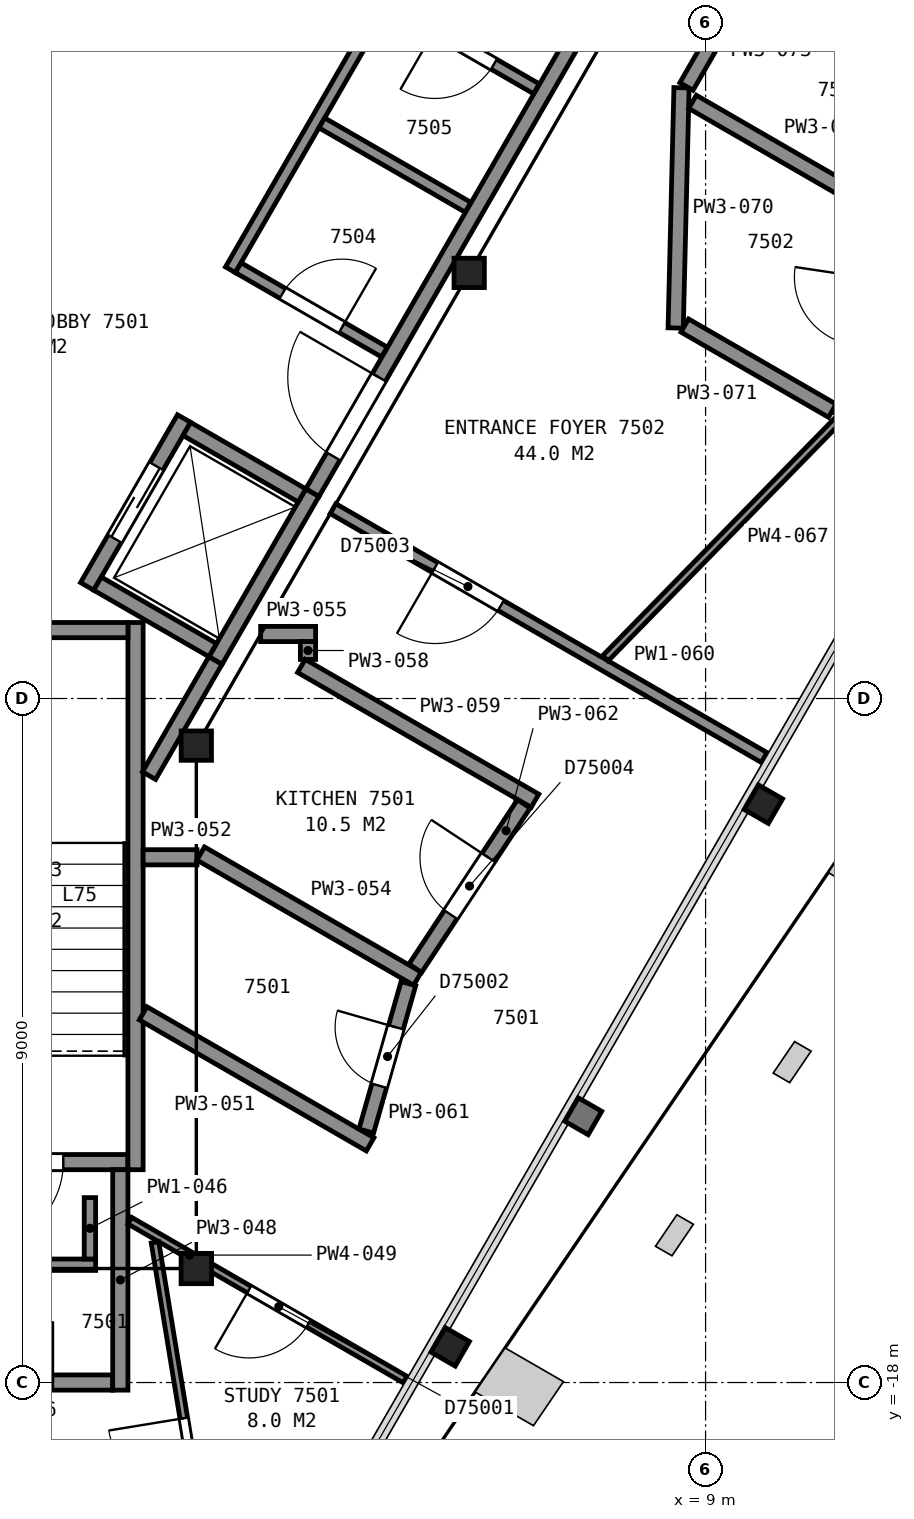
"""IFC4 building model, lengths in metres.
Left out: names, types, materials, properties, quantities, classifications, styles, units other than length and angle.
Written with IfcOpenShell. Run it as: python <this file> out.ifc"""

import sys

from ifc_helpers import new_model, si_unit, direction, frame, frame_2d, origin, origin_2d, place, context, subcontext, project, spatial, rectangle, i_section, extrude, element, fill, save


model = new_model("IFC4")
c1 = context("Model", 3, precision=1e-05, world=origin(), true_north=direction((0.0, 1.0)))
c2 = subcontext(c1, "Body", "Model", "MODEL_VIEW")
j1 = project(units=[si_unit("LENGTHUNIT", "METRE"), si_unit("PLANEANGLEUNIT", "RADIAN")], contexts=[c1])
p1 = place(None, origin())
s1 = spatial("IfcSite", under=j1, at=p1, CompositionType="ELEMENT")
p2 = place(p1, origin())
s2 = spatial("IfcBuilding", under=s1, at=p2, CompositionType="ELEMENT")
p3 = place(p2, frame((0.0, 0.0, 297.3)))
s3 = spatial("IfcBuildingStorey", under=s2, at=p3, CompositionType="ELEMENT", Elevation=297.3)
for number, where, z_axis, x_axis in (
    (1, (5.64, -17.53, 0.0), (0.0, 0.0, 1.0), (-0.5, -0.866, 0.0)),
    (2, (9.76, -10.39, 0.0), (0.0, 0.0, 1.0), (-0.5, -0.866, 0.0)),
):
    element("IfcColumn", number, at=place(p3, frame(where, z_axis=z_axis, x_axis=x_axis)), inside=s3, PredefinedType="COLUMN", context=c2, shape_type="SweptSolid", body=[
        extrude(i_section(OverallWidth=0.373, OverallDepth=0.368, WebThickness=0.015, FlangeThickness=0.024, FilletRadius=0.015, at=origin_2d()), origin(), (0.0, 0.0, 1.0), 3.7),
    ])
p4 = place(p3, frame((2.3, -16.5, 0.0), z_axis=(0.0, 0.0, 1.0), x_axis=(-1.0, 0.0, 0.0)))
e3 = element("IfcColumn", 3, at=p4, inside=s3, PredefinedType="COLUMN", context=c2, shape_type="SweptSolid", body=[
    extrude(i_section(OverallWidth=0.401, OverallDepth=0.399, WebThickness=0.025, FlangeThickness=0.04, FilletRadius=0.015, at=origin_2d()), origin(), (0.0, 0.0, 1.0), 3.7),
])
for number, where, z_axis, x_axis in (
    (4, (2.3, -9.62, 0.0), (0.0, 0.0, 1.0), (1.0, 0.0, 0.0)),
    (5, (5.89, -3.4, 0.0), (0.0, 0.0, 1.0), (1.0, 0.0, 0.0)),
):
    element("IfcColumn", number, at=place(p3, frame(where, z_axis=z_axis, x_axis=x_axis)), inside=s3, PredefinedType="COLUMN", context=c2, shape_type="SweptSolid", body=[
        extrude(i_section(OverallWidth=0.399, OverallDepth=0.386, WebThickness=0.021, FlangeThickness=0.033, FilletRadius=0.015, at=origin_2d()), origin(), (0.0, 0.0, 1.0), 3.7),
    ])
p5 = place(p3, frame((-1.4, -15.1, 0.0), z_axis=(0.0, 0.0, 1.0), x_axis=(1.0, 0.0, 0.0)))
e6 = element("IfcWall", 6, at=p5, inside=s3, PredefinedType="PARTITIONING", context=c2, shape_type="SweptSolid", body=[
    extrude(rectangle(XDim=2.8, YDim=0.2, at=frame_2d((1.4, 0.0))), origin(), (0.0, 0.0, 1.0), 3.45),
])
p6 = place(p5, frame((0.85, 0.0, 0.0)))
e7 = element("IfcOpeningElement", 7, at=p6, cuts=e6, PredefinedType="OPENING", context=c2, shape_type="SweptSolid", body=[
    extrude(rectangle(XDim=1.1, YDim=2.1, at=frame_2d((0.55, 1.05))), frame((0.0, 0.11, 0.0), z_axis=(0.0, -1.0, 0.0), x_axis=(1.0, 0.0, 0.0)), (0.0, 0.0, 1.0), 0.22),
])
p7 = place(p3, frame((1.5, -8.0, 0.0), z_axis=(0.0, 0.0, 1.0), x_axis=(0.0, -1.0, 0.0)))
e8 = element("IfcWall", 8, at=p7, inside=s3, PredefinedType="PARTITIONING", context=c2, shape_type="SweptSolid", body=[
    extrude(rectangle(XDim=7.2, YDim=0.2, at=frame_2d((3.6, 0.0))), origin(), (0.0, 0.0, 1.0), 3.45),
])
p8 = place(p3, frame((-1.4, -8.1, 0.0), z_axis=(0.0, 0.0, 1.0), x_axis=(1.0, 0.0, 0.0)))
e9 = element("IfcWall", 9, at=p8, inside=s3, PredefinedType="PARTITIONING", context=c2, shape_type="SweptSolid", body=[
    extrude(rectangle(XDim=2.8, YDim=0.2, at=frame_2d((1.4, 0.0))), origin(), (0.0, 0.0, 1.0), 3.45),
])
p9 = place(p3, frame((2.552, -8.5, 0.0), z_axis=(0.0, 0.0, 1.0), x_axis=(0.499990435942, 0.866030925526, 0.0)))
e10 = element("IfcWall", 10, at=p9, inside=s3, PredefinedType="PARTITIONING", context=c2, shape_type="SweptSolid", body=[
    extrude(rectangle(XDim=2.55, YDim=0.2, at=frame_2d((1.275, 0.0))), origin(), (0.0, 0.0, 1.0), 3.7),
])
p10 = place(p3, frame((0.863, -7.525, 0.0), z_axis=(0.0, 0.0, 1.0), x_axis=(0.499990435942, 0.866030925526, 0.0)))
e11 = element("IfcWall", 11, at=p10, inside=s3, PredefinedType="PARTITIONING", context=c2, shape_type="SweptSolid", body=[
    extrude(rectangle(XDim=2.55, YDim=0.2, at=frame_2d((1.275, 0.0))), origin(), (0.0, 0.0, 1.0), 3.7),
])
p11 = place(p10, frame((0.725, 0.0, 0.0)))
e12 = element("IfcOpeningElement", 12, at=p11, cuts=e11, PredefinedType="OPENING", context=c2, shape_type="SweptSolid", body=[
    extrude(rectangle(XDim=1.1, YDim=2.1, at=frame_2d((0.55, 1.05))), frame((0.0, 0.11, 0.0), z_axis=(0.0, -1.0, 0.0), x_axis=(1.0, 0.0, 0.0)), (0.0, 0.0, 1.0), 0.22),
])
for number, where, z_axis, x_axis in (
    (13, (3.69, -6.328, 0.0), (0.0, 0.0, 1.0), (-0.866, 0.5, 0.0)),
    (14, (2.515, -8.363, 0.0), (0.0, 0.0, 1.0), (-0.866, 0.5, 0.0)),
):
    element("IfcWall", number, at=place(p3, frame(where, z_axis=z_axis, x_axis=x_axis)), inside=s3, PredefinedType="PARTITIONING", context=c2, shape_type="SweptSolid", body=[
        extrude(rectangle(XDim=1.75, YDim=0.2, at=frame_2d((0.875, 0.0))), origin(), (0.0, 0.0, 1.0), 3.7),
    ])
p12 = place(p3, frame((1.677, -10.015, 0.0), z_axis=(0.0, 0.0, 1.0), x_axis=(0.49983532306, 0.866120459187, 0.0)))
e15 = element("IfcWall", 15, at=p12, inside=s3, PredefinedType="PARTITIONING", context=c2, shape_type="SweptSolid", body=[
    extrude(rectangle(XDim=1.748, YDim=0.2, at=frame_2d((0.874, 0.0))), origin(), (0.0, 0.0, 1.0), 3.45),
])
p13 = place(p3, frame((2.749, -3.359, 0.0), z_axis=(0.0, 0.0, 1.0), x_axis=(0.500017827812, 0.866015110648, 0.0)))
e16 = element("IfcWall", 16, at=p13, inside=s3, PredefinedType="PARTITIONING", context=c2, shape_type="SweptSolid", body=[
    extrude(rectangle(XDim=4.15, YDim=0.15, at=frame_2d((2.075, 0.0))), origin(), (0.0, 0.0, 1.0), 3.45),
])
p14 = place(p3, frame((2.851, -3.332, 0.0), z_axis=(0.0, 0.0, 1.0), x_axis=(0.866110524189, -0.499852538144, 0.0)))
e17 = element("IfcWall", 17, at=p14, inside=s3, PredefinedType="PARTITIONING", context=c2, shape_type="SweptSolid", body=[
    extrude(rectangle(XDim=2.22, YDim=0.15, at=frame_2d((1.11, 0.0))), origin(), (0.0, 0.0, 1.0), 3.45),
])
p15 = place(p14, frame((0.675, 0.0, 0.0)))
e18 = element("IfcOpeningElement", 18, at=p15, cuts=e17, PredefinedType="OPENING", context=c2, shape_type="SweptSolid", body=[
    extrude(rectangle(XDim=0.9, YDim=2.1, at=frame_2d((0.45, 1.05))), frame((0.0, 0.085, 0.0), z_axis=(0.0, -1.0, 0.0), x_axis=(1.0, 0.0, 0.0)), (0.0, 0.0, 1.0), 0.17),
])
p16 = place(p3, frame((3.828, -6.29, 0.0), z_axis=(0.0, 0.0, 1.0), x_axis=(0.499979739078, 0.866037101117, 0.0)))
e19 = element("IfcWall", 19, at=p16, inside=s3, PredefinedType="PARTITIONING", context=c2, shape_type="SweptSolid", body=[
    extrude(rectangle(XDim=11.363, YDim=0.2, at=frame_2d((5.681, 0.0))), origin(), (0.0, 0.0, 1.0), 3.45),
])
p17 = place(p16, frame((0.55, 0.0, 0.0)))
e20 = element("IfcOpeningElement", 20, at=p17, cuts=e19, PredefinedType="OPENING", context=c2, shape_type="SweptSolid", body=[
    extrude(rectangle(XDim=1.2, YDim=2.1, at=frame_2d((0.6, 1.05))), frame((0.0, 0.11, 0.0), z_axis=(0.0, -1.0, 0.0), x_axis=(1.0, 0.0, 0.0)), (0.0, 0.0, 1.0), 0.22),
])
p18 = place(p3, frame((3.951, -1.427, 0.0), z_axis=(0.0, 0.0, 1.0), x_axis=(0.866062920605, -0.499935013329, 0.0)))
e21 = element("IfcWall", 21, at=p18, inside=s3, PredefinedType="PARTITIONING", context=c2, shape_type="SweptSolid", body=[
    extrude(rectangle(XDim=2.22, YDim=0.15, at=frame_2d((1.11, 0.0))), origin(), (0.0, 0.0, 1.0), 3.45),
])
p19 = place(p3, frame((6.774, -0.978, 0.0), z_axis=(0.0, 0.0, 1.0), x_axis=(-0.866062920605, 0.499935013329, 0.0)))
e22 = element("IfcWall", 22, at=p19, inside=s3, PredefinedType="PARTITIONING", context=c2, shape_type="SweptSolid", body=[
    extrude(rectangle(XDim=2.22, YDim=0.15, at=frame_2d((1.11, 0.0))), origin(), (0.0, 0.0, 1.0), 3.45),
])
p20 = place(p19, frame((0.646, 0.0, 0.0)))
e23 = element("IfcOpeningElement", 23, at=p20, cuts=e22, PredefinedType="OPENING", context=c2, shape_type="SweptSolid", body=[
    extrude(rectangle(XDim=0.9, YDim=2.1, at=frame_2d((0.45, 1.05))), frame((0.0, 0.085, 0.0), z_axis=(0.0, -1.0, 0.0), x_axis=(1.0, 0.0, 0.0)), (0.0, 0.0, 1.0), 0.17),
])
p21 = place(p3, frame((-1.37, -16.45, 0.0), z_axis=(0.0, 0.0, 1.0), x_axis=(1.0, 0.0, 0.0)))
e24 = element("IfcWall", 24, at=p21, inside=s3, PredefinedType="PARTITIONING", context=c2, shape_type="SweptSolid", body=[
    extrude(rectangle(XDim=2.345, YDim=0.15, at=frame_2d((1.173, 0.0))), origin(), (0.0, 0.0, 1.0), 2.723),
])
p22 = place(p3, frame((-1.211, -18.0, 0.0), z_axis=(0.0, 0.0, 1.0), x_axis=(1.0, 0.0, 0.0)))
e25 = element("IfcWall", 25, at=p22, inside=s3, PredefinedType="PARTITIONING", context=c2, shape_type="SweptSolid", body=[
    extrude(rectangle(XDim=2.411, YDim=0.2, at=frame_2d((1.206, 0.0))), origin(), (0.0, 0.0, 1.0), 2.723),
])
p23 = place(p22, frame((0.825, 0.0, 0.0)))
e26 = element("IfcOpeningElement", 26, at=p23, cuts=e25, PredefinedType="OPENING", context=c2, shape_type="SweptSolid", body=[
    extrude(rectangle(XDim=0.8, YDim=2.1, at=frame_2d((0.4, 1.05))), frame((0.0, 0.11, 0.0), z_axis=(0.0, -1.0, 0.0), x_axis=(1.0, 0.0, 0.0)), (0.0, 0.0, 1.0), 0.22),
])
p24 = place(p3, frame((0.9, -16.375, 0.0), z_axis=(0.0, 0.0, 1.0), x_axis=(0.0, 1.0, 0.0)))
e27 = element("IfcWall", 27, at=p24, inside=s3, PredefinedType="PARTITIONING", context=c2, shape_type="SweptSolid", body=[
    extrude(rectangle(XDim=0.808, YDim=0.15, at=frame_2d((0.404, 0.0))), origin(), (0.0, 0.0, 1.0), 2.723),
])
p25 = place(p3, frame((1.3, -18.1, 0.0), z_axis=(0.0, 0.0, 1.0), x_axis=(0.0, 1.0, 0.0)))
e28 = element("IfcWall", 28, at=p25, inside=s3, PredefinedType="PARTITIONING", context=c2, shape_type="SweptSolid", body=[
    extrude(rectangle(XDim=2.9, YDim=0.2, at=frame_2d((1.45, 0.0))), origin(), (0.0, 0.0, 1.0), 2.723),
])
p26 = place(p3, frame((5.047, -17.961, 0.0), z_axis=(0.0, 0.0, 1.0), x_axis=(-0.866050460131, 0.499956598623, 0.0)))
e29 = element("IfcWall", 29, at=p26, inside=s3, PredefinedType="PARTITIONING", context=c2, shape_type="SweptSolid", body=[
    extrude(rectangle(XDim=4.182, YDim=0.1, at=frame_2d((2.091, 0.0))), origin(), (0.0, 0.0, 1.0), 2.723),
])
p27 = place(p26, frame((1.469, 0.0, 0.0)))
e30 = element("IfcOpeningElement", 30, at=p27, cuts=e29, PredefinedType="OPENING", context=c2, shape_type="SweptSolid", body=[
    extrude(rectangle(XDim=0.9, YDim=2.1, at=frame_2d((0.45, 1.05))), frame((0.0, 0.06, 0.0), z_axis=(0.0, -1.0, 0.0), x_axis=(1.0, 0.0, 0.0)), (0.0, 0.0, 1.0), 0.12),
])
p28 = place(p3, frame((1.6, -13.142, 0.0), z_axis=(0.0, 0.0, 1.0), x_axis=(0.866078307516, -0.499908356852, 0.0)))
e31 = element("IfcWall", 31, at=p28, inside=s3, PredefinedType="PARTITIONING", context=c2, shape_type="SweptSolid", body=[
    extrude(rectangle(XDim=3.448, YDim=0.2, at=frame_2d((1.724, 0.0))), origin(), (0.0, 0.0, 1.0), 2.723),
])
p29 = place(p3, frame((1.6, -11.089, 0.0), z_axis=(0.0, 0.0, 1.0), x_axis=(1.0, 0.0, 0.0)))
e32 = element("IfcWall", 32, at=p29, inside=s3, PredefinedType="PARTITIONING", context=c2, shape_type="SweptSolid", body=[
    extrude(rectangle(XDim=0.709, YDim=0.2, at=frame_2d((0.354, 0.0))), origin(), (0.0, 0.0, 1.0), 2.723),
])
p30 = place(p3, frame((2.721, -22.048, 0.0), z_axis=(0.0, 0.0, 1.0), x_axis=(-0.161659467857, 0.98684660229, 0.0)))
e33 = element("IfcWall", 33, at=p30, inside=s3, PredefinedType="PARTITIONING", context=c2, shape_type="SweptSolid", body=[
    extrude(rectangle(XDim=5.97, YDim=0.1, at=frame_2d((2.985, 0.0))), origin(), (0.0, 0.0, 1.0), 2.723),
])
p31 = place(p30, frame((2.625, 0.0, 0.0)))
e34 = element("IfcOpeningElement", 34, at=p31, cuts=e33, PredefinedType="OPENING", context=c2, shape_type="SweptSolid", body=[
    extrude(rectangle(XDim=1.0, YDim=2.1, at=frame_2d((0.5, 1.05))), frame((0.0, 0.06, 0.0), z_axis=(0.0, -1.0, 0.0), x_axis=(1.0, 0.0, 0.0)), (0.0, 0.0, 1.0), 0.12),
])
p32 = place(p3, frame((2.357, -11.039, 0.0), z_axis=(0.0, 0.0, 1.0), x_axis=(0.865999185644, -0.500045408402, 0.0)))
e35 = element("IfcWall", 35, at=p32, inside=s3, PredefinedType="PARTITIONING", context=c2, shape_type="SweptSolid", body=[
    extrude(rectangle(XDim=3.294, YDim=0.2, at=frame_2d((1.647, 0.0))), origin(), (0.0, 0.0, 1.0), 2.723),
])
p33 = place(p3, frame((3.146, -8.151, 0.0), z_axis=(0.0, 0.0, 1.0), x_axis=(1.0, 0.0, 0.0)))
e36 = element("IfcWall", 36, at=p33, inside=s3, PredefinedType="PARTITIONING", context=c2, shape_type="SweptSolid", body=[
    extrude(rectangle(XDim=0.723, YDim=0.2, at=frame_2d((0.361, 0.0))), origin(), (0.0, 0.0, 1.0), 2.723),
])
p34 = place(p3, frame((3.769, -8.486, 0.0), z_axis=(0.0, 0.0, 1.0), x_axis=(0.0, 1.0, 0.0)))
e37 = element("IfcWall", 37, at=p34, inside=s3, PredefinedType="PARTITIONING", context=c2, shape_type="SweptSolid", body=[
    extrude(rectangle(XDim=0.235, YDim=0.2, at=frame_2d((0.118, 0.0))), origin(), (0.0, 0.0, 1.0), 2.723),
])
p35 = place(p3, frame((3.682, -8.571, 0.0), z_axis=(0.0, 0.0, 1.0), x_axis=(0.866075604562, -0.499913039621, 0.0)))
e38 = element("IfcWall", 38, at=p35, inside=s3, PredefinedType="PARTITIONING", context=c2, shape_type="SweptSolid", body=[
    extrude(rectangle(XDim=3.549, YDim=0.2, at=frame_2d((1.774, 0.0))), origin(), (0.0, 0.0, 1.0), 2.723),
])
p36 = place(p3, frame((9.772, -9.777, 0.0), z_axis=(0.0, 0.0, 1.0), x_axis=(-0.866083818164, 0.499898809675, 0.0)))
e39 = element("IfcWall", 39, at=p36, inside=s3, PredefinedType="PARTITIONING", context=c2, shape_type="SweptSolid", body=[
    extrude(rectangle(XDim=6.551, YDim=0.15, at=frame_2d((3.275, 0.0))), origin(), (0.0, 0.0, 1.0), 2.723),
])
p37 = place(p36, frame((4.001, 0.0, 0.0)))
e40 = element("IfcOpeningElement", 40, at=p37, cuts=e39, PredefinedType="OPENING", context=c2, shape_type="SweptSolid", body=[
    extrude(rectangle(XDim=1.0, YDim=2.1, at=frame_2d((0.5, 1.05))), frame((0.0, 0.085, 0.0), z_axis=(0.0, -1.0, 0.0), x_axis=(1.0, 0.0, 0.0)), (0.0, 0.0, 1.0), 0.17),
])
p38 = place(p3, frame((4.536, -14.691, 0.0), z_axis=(0.0, 0.0, 1.0), x_axis=(0.27486499374, 0.961482831472, 0.0)))
e41 = element("IfcWall", 41, at=p38, inside=s3, PredefinedType="PARTITIONING", context=c2, shape_type="SweptSolid", body=[
    extrude(rectangle(XDim=2.017, YDim=0.2, at=frame_2d((1.009, 0.0))), origin(), (0.0, 0.0, 1.0), 2.723),
])
p39 = place(p38, frame((0.62, 0.0, 0.0)))
e42 = element("IfcOpeningElement", 42, at=p39, cuts=e41, PredefinedType="OPENING", context=c2, shape_type="SweptSolid", body=[
    extrude(rectangle(XDim=0.8, YDim=2.1, at=frame_2d((0.4, 1.05))), frame((0.0, 0.11, 0.0), z_axis=(0.0, -1.0, 0.0), x_axis=(1.0, 0.0, 0.0)), (0.0, 0.0, 1.0), 0.22),
])
p40 = place(p3, frame((5.181, -12.548, 0.0), z_axis=(0.0, 0.0, 1.0), x_axis=(0.55106277299, 0.834463792039, 0.0)))
e43 = element("IfcWall", 43, at=p40, inside=s3, PredefinedType="PARTITIONING", context=c2, shape_type="SweptSolid", body=[
    extrude(rectangle(XDim=2.59, YDim=0.2, at=frame_2d((1.295, 0.0))), origin(), (0.0, 0.0, 1.0), 2.723),
])
p41 = place(p40, frame((0.845, 0.0, 0.0)))
e44 = element("IfcOpeningElement", 44, at=p41, cuts=e43, PredefinedType="OPENING", context=c2, shape_type="SweptSolid", body=[
    extrude(rectangle(XDim=0.9, YDim=2.1, at=frame_2d((0.45, 1.05))), frame((0.0, 0.11, 0.0), z_axis=(0.0, -1.0, 0.0), x_axis=(1.0, 0.0, 0.0)), (0.0, 0.0, 1.0), 0.22),
])
p42 = place(p3, frame((7.682, -8.47, 0.0), z_axis=(0.0, 0.0, 1.0), x_axis=(0.698777378461, 0.715339203002, 0.0)))
e45 = element("IfcWall", 45, at=p42, inside=s3, PredefinedType="PARTITIONING", context=c2, shape_type="SweptSolid", body=[
    extrude(rectangle(XDim=4.452, YDim=0.1, at=frame_2d((2.226, 0.0))), origin(), (0.0, 0.0, 1.0), 2.723),
])
p43 = place(p3, frame((8.607, -4.125, 0.0), z_axis=(0.0, 0.0, 1.0), x_axis=(0.024245593124, 0.999706032399, 0.0)))
e46 = element("IfcWall", 46, at=p43, inside=s3, PredefinedType="PARTITIONING", context=c2, shape_type="SweptSolid", body=[
    extrude(rectangle(XDim=3.162, YDim=0.2, at=frame_2d((1.581, 0.0))), origin(), (0.0, 0.0, 1.0), 2.723),
])
p44 = place(p3, frame((8.726, -4.093, 0.0), z_axis=(0.0, 0.0, 1.0), x_axis=(0.866056839033, -0.499945548598, 0.0)))
e47 = element("IfcWall", 47, at=p44, inside=s3, PredefinedType="PARTITIONING", context=c2, shape_type="SweptSolid", body=[
    extrude(rectangle(XDim=2.242, YDim=0.2, at=frame_2d((1.121, 0.0))), origin(), (0.0, 0.0, 1.0), 2.723),
])
p45 = place(p3, frame((8.749, -0.947, 0.0), z_axis=(0.0, 0.0, 1.0), x_axis=(0.499656913366, 0.866223394354, 0.0)))
e48 = element("IfcWall", 48, at=p45, inside=s3, PredefinedType="PARTITIONING", context=c2, shape_type="SweptSolid", body=[
    extrude(rectangle(XDim=1.075, YDim=0.2, at=frame_2d((0.538, 0.0))), origin(), (0.0, 0.0, 1.0), 2.723),
])
p46 = place(p3, frame((8.828, -1.149, 0.0), z_axis=(0.0, 0.0, 1.0), x_axis=(0.865853899269, -0.50029693695, 0.0)))
e49 = element("IfcWall", 49, at=p46, inside=s3, PredefinedType="PARTITIONING", context=c2, shape_type="SweptSolid", body=[
    extrude(rectangle(XDim=2.734, YDim=0.2, at=frame_2d((1.367, 0.0))), origin(), (0.0, 0.0, 1.0), 2.723),
])
p47 = place(p6, origin())
e50 = element("IfcDoor", 50, at=p47, inside=s3, OperationType="SINGLE_SWING_LEFT", PredefinedType="DOOR", context=c2, shape_type="SweptSolid", body=[
    extrude(rectangle(XDim=1.1, YDim=2.1, at=frame_2d((0.55, 1.05))), frame((0.0, 0.025, 0.0), z_axis=(0.0, -1.0, 0.0), x_axis=(1.0, 0.0, 0.0)), (0.0, 0.0, 1.0), 0.05),
])
fill(e7, e50)
p48 = place(p11, origin())
e51 = element("IfcDoor", 51, at=p48, inside=s3, OperationType="SLIDING_TO_LEFT", PredefinedType="DOOR", context=c2, shape_type="SweptSolid", body=[
    extrude(rectangle(XDim=1.1, YDim=2.1, at=frame_2d((0.55, 1.05))), frame((0.0, 0.025, 0.0), z_axis=(0.0, -1.0, 0.0), x_axis=(1.0, 0.0, 0.0)), (0.0, 0.0, 1.0), 0.05),
])
fill(e12, e51)
p49 = place(p15, origin())
e52 = element("IfcDoor", 52, at=p49, inside=s3, OperationType="SINGLE_SWING_RIGHT", PredefinedType="DOOR", context=c2, shape_type="SweptSolid", body=[
    extrude(rectangle(XDim=0.9, YDim=2.1, at=frame_2d((0.45, 1.05))), frame((0.0, 0.025, 0.0), z_axis=(0.0, -1.0, 0.0), x_axis=(1.0, 0.0, 0.0)), (0.0, 0.0, 1.0), 0.05),
])
fill(e18, e52)
p50 = place(p17, origin())
e53 = element("IfcDoor", 53, at=p50, inside=s3, OperationType="SINGLE_SWING_RIGHT", PredefinedType="DOOR", context=c2, shape_type="SweptSolid", body=[
    extrude(rectangle(XDim=1.2, YDim=2.1, at=frame_2d((0.6, 1.05))), frame((0.0, 0.025, 0.0), z_axis=(0.0, -1.0, 0.0), x_axis=(1.0, 0.0, 0.0)), (0.0, 0.0, 1.0), 0.05),
])
fill(e20, e53)
p51 = place(p20, origin())
e54 = element("IfcDoor", 54, at=p51, inside=s3, OperationType="SINGLE_SWING_RIGHT", PredefinedType="DOOR", context=c2, shape_type="SweptSolid", body=[
    extrude(rectangle(XDim=0.9, YDim=2.1, at=frame_2d((0.45, 1.05))), frame((0.0, 0.025, 0.0), z_axis=(0.0, -1.0, 0.0), x_axis=(1.0, 0.0, 0.0)), (0.0, 0.0, 1.0), 0.05),
])
fill(e23, e54)
p52 = place(p23, origin())
e55 = element("IfcDoor", 55, at=p52, inside=s3, OperationType="SINGLE_SWING_RIGHT", PredefinedType="DOOR", context=c2, shape_type="SweptSolid", body=[
    extrude(rectangle(XDim=0.8, YDim=2.1, at=frame_2d((0.4, 1.05))), frame((0.0, 0.025, 0.0), z_axis=(0.0, -1.0, 0.0), x_axis=(1.0, 0.0, 0.0)), (0.0, 0.0, 1.0), 0.05),
])
fill(e26, e55)
p53 = place(p27, origin())
e56 = element("IfcDoor", 56, at=p53, inside=s3, OperationType="SINGLE_SWING_RIGHT", PredefinedType="DOOR", context=c2, shape_type="SweptSolid", body=[
    extrude(rectangle(XDim=0.9, YDim=2.1, at=frame_2d((0.45, 1.05))), frame((0.0, 0.025, 0.0), z_axis=(0.0, -1.0, 0.0), x_axis=(1.0, 0.0, 0.0)), (0.0, 0.0, 1.0), 0.05),
])
fill(e30, e56)
p54 = place(p31, origin())
e57 = element("IfcDoor", 57, at=p54, inside=s3, OperationType="SINGLE_SWING_RIGHT", PredefinedType="DOOR", context=c2, shape_type="SweptSolid", body=[
    extrude(rectangle(XDim=1.0, YDim=2.1, at=frame_2d((0.5, 1.05))), frame((0.0, 0.025, 0.0), z_axis=(0.0, -1.0, 0.0), x_axis=(1.0, 0.0, 0.0)), (0.0, 0.0, 1.0), 0.05),
])
fill(e34, e57)
p55 = place(p37, origin())
e58 = element("IfcDoor", 58, at=p55, inside=s3, OperationType="SINGLE_SWING_RIGHT", PredefinedType="DOOR", context=c2, shape_type="SweptSolid", body=[
    extrude(rectangle(XDim=1.0, YDim=2.1, at=frame_2d((0.5, 1.05))), frame((0.0, 0.025, 0.0), z_axis=(0.0, -1.0, 0.0), x_axis=(1.0, 0.0, 0.0)), (0.0, 0.0, 1.0), 0.05),
])
fill(e40, e58)
p56 = place(p39, origin())
e59 = element("IfcDoor", 59, at=p56, inside=s3, OperationType="SINGLE_SWING_RIGHT", PredefinedType="DOOR", context=c2, shape_type="SweptSolid", body=[
    extrude(rectangle(XDim=0.8, YDim=2.1, at=frame_2d((0.4, 1.05))), frame((0.0, 0.025, 0.0), z_axis=(0.0, -1.0, 0.0), x_axis=(1.0, 0.0, 0.0)), (0.0, 0.0, 1.0), 0.05),
])
fill(e42, e59)
p57 = place(p41, origin())
e60 = element("IfcDoor", 60, at=p57, inside=s3, OperationType="SINGLE_SWING_RIGHT", PredefinedType="DOOR", context=c2, shape_type="SweptSolid", body=[
    extrude(rectangle(XDim=0.9, YDim=2.1, at=frame_2d((0.45, 1.05))), frame((0.0, 0.025, 0.0), z_axis=(0.0, -1.0, 0.0), x_axis=(1.0, 0.0, 0.0)), (0.0, 0.0, 1.0), 0.05),
])
fill(e44, e60)
save(model, sys.argv[1])
